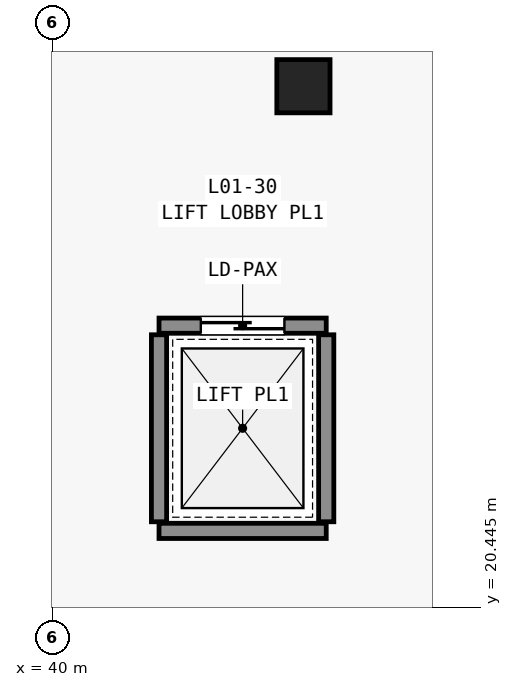
"""IFC4 building model, lengths in metres.
Left out: names, types, materials, properties, quantities, classifications, styles, units other than length and angle.
Written with IfcOpenShell. Run it as: python <this file> out.ifc"""

import sys

from ifc_helpers import new_model, si_unit, direction, frame, frame_2d, origin, origin_2d, place, context, subcontext, project, spatial, rectangle, extrude, element, fill, save


model = new_model("IFC4")
c1 = context("Model", 3, precision=1e-05, world=origin(), true_north=direction((0.0, 1.0)))
c2 = subcontext(c1, "Body", "Model", "MODEL_VIEW")
j1 = project(units=[si_unit("LENGTHUNIT", "METRE"), si_unit("PLANEANGLEUNIT", "RADIAN")], contexts=[c1])
p1 = place(None, origin())
s1 = spatial("IfcSite", under=j1, at=p1, CompositionType="ELEMENT")
p2 = place(p1, origin())
s2 = spatial("IfcBuilding", under=s1, at=p2, CompositionType="ELEMENT")
p3 = place(p2, frame((0.0, 0.0, 6.0)))
s3 = spatial("IfcBuildingStorey", under=s2, at=p3, CompositionType="ELEMENT", Elevation=6.0)
p4 = place(p3, frame((43.3, 27.3, 0.0), z_axis=(0.0, 0.0, 1.0), x_axis=(1.0, 0.0, 0.0)))
e1 = element("IfcColumn", 1, at=p4, inside=s3, PredefinedType="COLUMN", context=c2, shape_type="SweptSolid", body=[
    extrude(rectangle(XDim=0.7, YDim=0.7, at=origin_2d()), origin(), (0.0, 0.0, 1.0), 5.4),
])
p5 = place(p3, frame((41.4, 21.45, 0.0), z_axis=(0.0, 0.0, 1.0), x_axis=(1.0, 0.0, 0.0)))
e2 = element("IfcWall", 2, at=p5, inside=s3, PredefinedType="STANDARD", context=c2, shape_type="SweptSolid", body=[
    extrude(rectangle(XDim=2.2, YDim=0.2, at=frame_2d((1.1, 0.0))), origin(), (0.0, 0.0, 1.0), 5.04),
])
p6 = place(p3, frame((41.4, 24.15, 0.0), z_axis=(0.0, 0.0, 1.0), x_axis=(1.0, 0.0, 0.0)))
e3 = element("IfcWall", 3, at=p6, inside=s3, PredefinedType="STANDARD", context=c2, shape_type="SweptSolid", body=[
    extrude(rectangle(XDim=2.2, YDim=0.2, at=frame_2d((1.1, 0.0))), origin(), (0.0, 0.0, 1.0), 5.04),
])
p7 = place(p6, frame((0.55, 0.0, 0.0)))
e4 = element("IfcOpeningElement", 4, at=p7, cuts=e3, PredefinedType="OPENING", context=c2, shape_type="SweptSolid", body=[
    extrude(rectangle(XDim=1.1, YDim=2.15, at=frame_2d((0.55, 1.075))), frame((0.0, 0.11, 0.0), z_axis=(0.0, -1.0, 0.0), x_axis=(1.0, 0.0, 0.0)), (0.0, 0.0, 1.0), 0.22),
])
for number, where, z_axis, x_axis in (
    (5, (41.4, 21.57, 0.0), (0.0, 0.0, 1.0), (0.0, 1.0, 0.0)),
    (6, (43.6, 21.57, 0.0), (0.0, 0.0, 1.0), (0.0, 1.0, 0.0)),
):
    element("IfcWall", number, at=place(p3, frame(where, z_axis=z_axis, x_axis=x_axis)), inside=s3, PredefinedType="STANDARD", context=c2, shape_type="SweptSolid", body=[
        extrude(rectangle(XDim=2.46, YDim=0.2, at=frame_2d((1.23, 0.0))), origin(), (0.0, 0.0, 1.0), 5.04),
    ])
p8 = place(p7, origin())
e7 = element("IfcDoor", 7, at=p8, inside=s3, OperationType="SLIDING_TO_LEFT", PredefinedType="DOOR", context=c2, shape_type="SweptSolid", body=[
    extrude(rectangle(XDim=1.1, YDim=2.15, at=frame_2d((0.55, 1.075))), frame((0.0, 0.025, 0.0), z_axis=(0.0, -1.0, 0.0), x_axis=(1.0, 0.0, 0.0)), (0.0, 0.0, 1.0), 0.05),
])
fill(e4, e7)
save(model, sys.argv[1])
